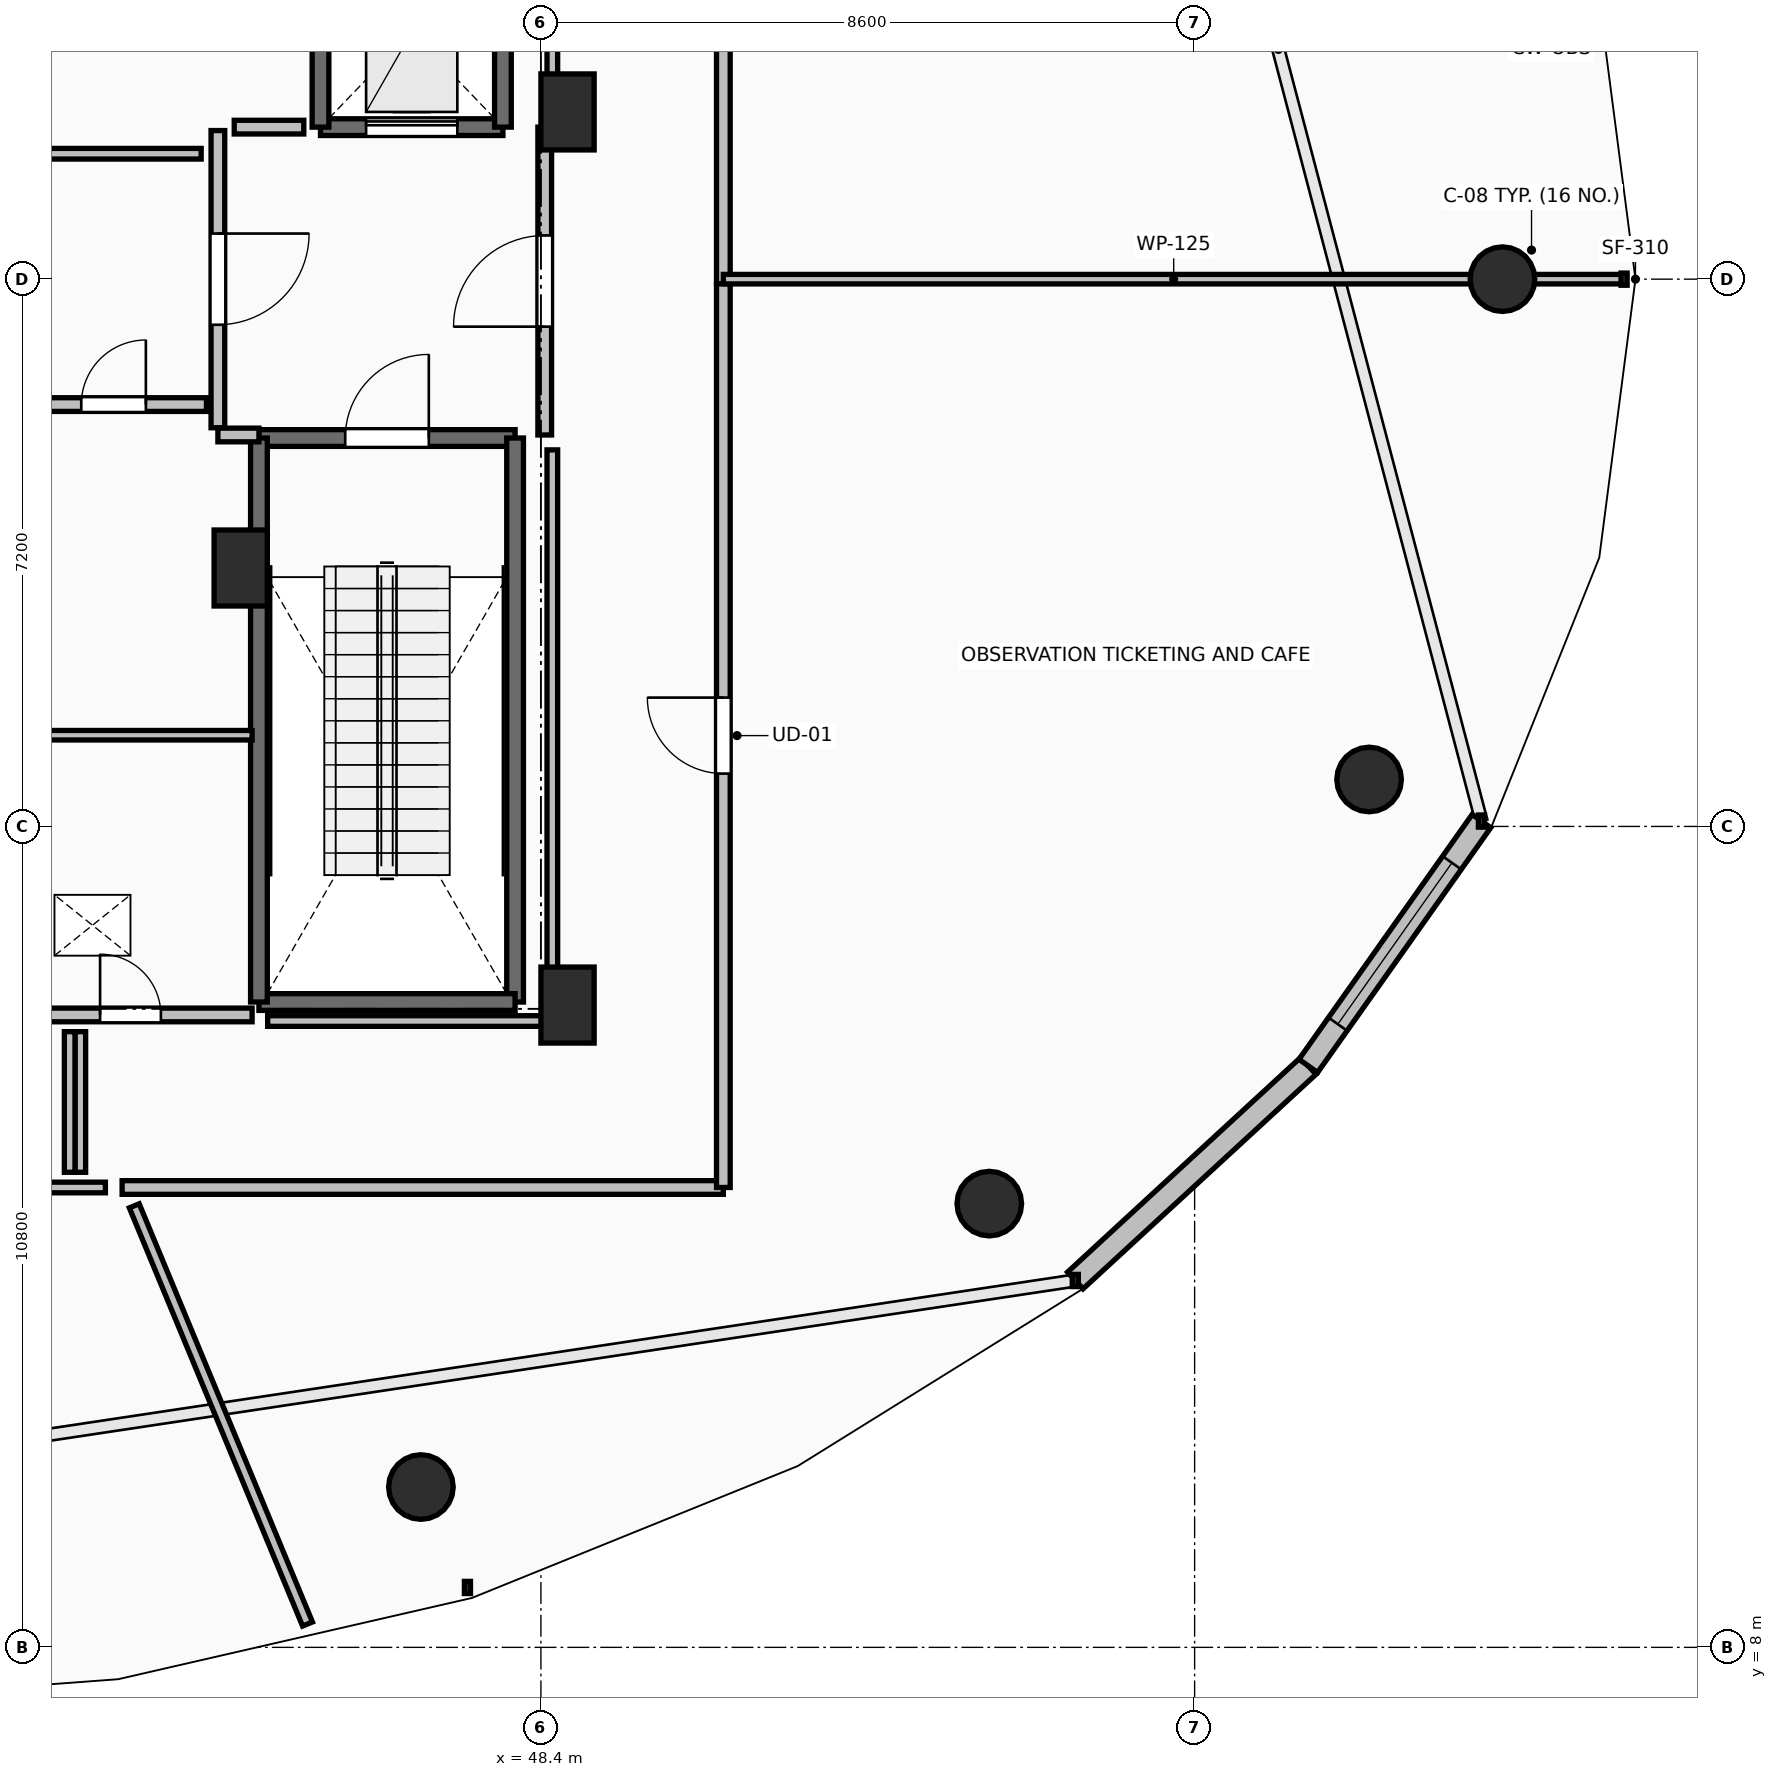
"""IFC4 building model, lengths in metres.
Left out: names, types, materials, properties, quantities, classifications, styles, units other than length and angle.
Written with IfcOpenShell. Run it as: python <this file> out.ifc"""

import sys

from ifc_helpers import new_model, si_unit, direction, frame, frame_2d, origin, origin_2d, place, context, subcontext, project, spatial, rectangle, circle, extrude, element, fill, save


model = new_model("IFC4")
c1 = context("Model", 3, precision=1e-05, world=origin(), true_north=direction((0.0, 1.0)))
c2 = subcontext(c1, "Body", "Model", "MODEL_VIEW")
j1 = project(units=[si_unit("LENGTHUNIT", "METRE"), si_unit("PLANEANGLEUNIT", "RADIAN")], contexts=[c1])
p1 = place(None, origin())
s1 = spatial("IfcSite", under=j1, at=p1, CompositionType="ELEMENT")
p2 = place(p1, origin())
s2 = spatial("IfcBuilding", under=s1, at=p2, CompositionType="ELEMENT")
p3 = place(p2, frame((0.0, 0.0, 285.4)))
s3 = spatial("IfcBuildingStorey", under=s2, at=p3, CompositionType="ELEMENT", Elevation=285.4)
for number, where, z_axis, x_axis in (
    (1, (61.05, 26.0, 0.0), (0.0, 0.0, 1.0), (1.0, 0.0, 0.0)),
    (2, (46.821, 10.109, 0.0), (0.0, 0.0, 1.0), (0.383, -0.924, 0.0)),
    (3, (54.299, 13.838, 0.0), (0.0, 0.0, 1.0), (0.707, -0.707, 0.0)),
    (4, (59.295, 19.418, 0.0), (0.0, 0.0, 1.0), (0.924, -0.383, 0.0)),
):
    element("IfcColumn", number, at=place(p3, frame(where, z_axis=z_axis, x_axis=x_axis)), inside=s3, PredefinedType="COLUMN", context=c2, shape_type="SweptSolid", body=[
        extrude(circle(Radius=0.425, at=origin_2d()), origin(), (0.0, 0.0, 1.0), 5.0),
    ])
for number, where, z_axis, x_axis in (
    (5, (48.75, 28.2, 0.0), (0.0, 0.0, 1.0), (1.0, 0.0, 0.0)),
    (6, (48.75, 16.45, 0.0), (0.0, 0.0, 1.0), (1.0, 0.0, 0.0)),
    (7, (44.45, 22.2, 0.0), (0.0, 0.0, 1.0), (1.0, 0.0, 0.0)),
):
    element("IfcColumn", number, at=place(p3, frame(where, z_axis=z_axis, x_axis=x_axis)), inside=s3, PredefinedType="PILASTER", context=c2, shape_type="SweptSolid", body=[
        extrude(rectangle(XDim=0.7, YDim=1.0, at=origin_2d()), origin(), (0.0, 0.0, 1.0), 5.0),
    ])
p4 = place(p3, frame((55.43, 12.827, 0.0), z_axis=(0.0, 0.0, 1.0), x_axis=(0.735595808164, 0.677420701641, 0.0)))
e8 = element("IfcWall", 8, at=p4, inside=s3, PredefinedType="STANDARD", context=c2, shape_type="SweptSolid", body=[
    extrude(rectangle(XDim=4.167, YDim=0.3, at=frame_2d((2.083, 0.0))), origin(), (0.0, 0.0, 1.0), 4.69),
])
p5 = place(p3, frame((58.496, 15.65, 0.0), z_axis=(0.0, 0.0, 1.0), x_axis=(0.577438563223, 0.816434140457, 0.0)))
e9 = element("IfcWall", 9, at=p5, inside=s3, PredefinedType="STANDARD", context=c2, shape_type="SweptSolid", body=[
    extrude(rectangle(XDim=3.945, YDim=0.3, at=frame_2d((1.973, 0.0))), origin(), (0.0, 0.0, 1.0), 4.69),
])
p6 = place(p5, frame((0.673, 0.0, 0.85)))
e10 = element("IfcOpeningElement", 10, at=p6, cuts=e9, PredefinedType="OPENING", context=c2, shape_type="SweptSolid", body=[
    extrude(rectangle(XDim=2.6, YDim=2.5, at=frame_2d((1.3, 1.25))), frame((0.0, 0.165, 0.0), z_axis=(0.0, -1.0, 0.0), x_axis=(1.0, 0.0, 0.0)), (0.0, 0.0, 1.0), 0.33),
])
p7 = place(p3, frame((44.69, 23.91, 0.0), z_axis=(0.0, 0.0, 1.0), x_axis=(1.0, 0.0, 0.0)))
e11 = element("IfcWall", 11, at=p7, inside=s3, PredefinedType="SOLIDWALL", context=c2, shape_type="SweptSolid", body=[
    extrude(rectangle(XDim=3.37, YDim=0.22, at=frame_2d((1.685, 0.0))), origin(), (0.0, 0.0, 1.0), 4.69),
])
p8 = place(p7, frame((1.135, 0.0, 0.0)))
e12 = element("IfcOpeningElement", 12, at=p8, cuts=e11, PredefinedType="OPENING", context=c2, shape_type="SweptSolid", body=[
    extrude(rectangle(XDim=1.1, YDim=2.15, at=frame_2d((0.55, 1.075))), frame((0.0, 0.125, 0.0), z_axis=(0.0, -1.0, 0.0), x_axis=(1.0, 0.0, 0.0)), (0.0, 0.0, 1.0), 0.25),
])
p9 = place(p3, frame((48.06, 23.91, 0.0), z_axis=(0.0, 0.0, 1.0), x_axis=(0.0, -1.0, 0.0)))
e13 = element("IfcWall", 13, at=p9, inside=s3, PredefinedType="SOLIDWALL", context=c2, shape_type="SweptSolid", body=[
    extrude(rectangle(XDim=7.42, YDim=0.22, at=frame_2d((3.71, 0.0))), origin(), (0.0, 0.0, 1.0), 4.69),
])
p10 = place(p3, frame((48.06, 16.49, 0.0), z_axis=(0.0, 0.0, 1.0), x_axis=(-1.0, 0.0, 0.0)))
e14 = element("IfcWall", 14, at=p10, inside=s3, PredefinedType="SOLIDWALL", context=c2, shape_type="SweptSolid", body=[
    extrude(rectangle(XDim=3.37, YDim=0.22, at=frame_2d((1.685, 0.0))), origin(), (0.0, 0.0, 1.0), 4.69),
])
p11 = place(p3, frame((44.69, 16.49, 0.0), z_axis=(0.0, 0.0, 1.0), x_axis=(0.0, 1.0, 0.0)))
e15 = element("IfcWall", 15, at=p11, inside=s3, PredefinedType="SOLIDWALL", context=c2, shape_type="SweptSolid", body=[
    extrude(rectangle(XDim=7.42, YDim=0.22, at=frame_2d((3.71, 0.0))), origin(), (0.0, 0.0, 1.0), 4.69),
])
p12 = place(p3, frame((45.5, 28.0, 0.0), z_axis=(0.0, 0.0, 1.0), x_axis=(1.0, 0.0, 0.0)))
e16 = element("IfcWall", 16, at=p12, inside=s3, PredefinedType="SHEAR", context=c2, shape_type="SweptSolid", body=[
    extrude(rectangle(XDim=2.4, YDim=0.22, at=frame_2d((1.2, 0.0))), origin(), (0.0, 0.0, 1.0), 4.69),
])
p13 = place(p12, frame((0.6, 0.0, 0.0)))
e17 = element("IfcOpeningElement", 17, at=p13, cuts=e16, PredefinedType="OPENING", context=c2, shape_type="SweptSolid", body=[
    extrude(rectangle(XDim=1.2, YDim=2.2, at=frame_2d((0.6, 1.1))), frame((0.0, 0.125, 0.0), z_axis=(0.0, -1.0, 0.0), x_axis=(1.0, 0.0, 0.0)), (0.0, 0.0, 1.0), 0.25),
])
for number, where, z_axis, x_axis in (
    (18, (47.9, 28.0, 0.0), (0.0, 0.0, 1.0), (0.0, 1.0, 0.0)),
    (19, (45.5, 30.5, 0.0), (0.0, 0.0, 1.0), (0.0, -1.0, 0.0)),
):
    element("IfcWall", number, at=place(p3, frame(where, z_axis=z_axis, x_axis=x_axis)), inside=s3, PredefinedType="SHEAR", context=c2, shape_type="SweptSolid", body=[
        extrude(rectangle(XDim=2.5, YDim=0.22, at=frame_2d((1.25, 0.0))), origin(), (0.0, 0.0, 1.0), 4.69),
    ])
p14 = place(p3, frame((44.15, 27.955, 0.0), z_axis=(0.0, 0.0, 1.0), x_axis=(0.0, -1.0, 0.0)))
e20 = element("IfcWall", 20, at=p14, inside=s3, PredefinedType="PARTITIONING", context=c2, shape_type="SweptSolid", body=[
    extrude(rectangle(XDim=3.91, YDim=0.18, at=frame_2d((1.955, 0.0))), origin(), (0.0, 0.0, 1.0), 4.69),
])
p15 = place(p14, frame((1.355, 0.0, 0.0)))
e21 = element("IfcOpeningElement", 21, at=p15, cuts=e20, PredefinedType="OPENING", context=c2, shape_type="SweptSolid", body=[
    extrude(rectangle(XDim=1.2, YDim=2.15, at=frame_2d((0.6, 1.075))), frame((0.0, 0.105, 0.0), z_axis=(0.0, -1.0, 0.0), x_axis=(1.0, 0.0, 0.0)), (0.0, 0.0, 1.0), 0.21),
])
p16 = place(p3, frame((44.15, 23.95, 0.0), z_axis=(0.0, 0.0, 1.0), x_axis=(1.0, 0.0, 0.0)))
e22 = element("IfcWall", 22, at=p16, inside=s3, PredefinedType="PARTITIONING", context=c2, shape_type="SweptSolid", body=[
    extrude(rectangle(XDim=0.54, YDim=0.18, at=frame_2d((0.27, 0.0))), origin(), (0.0, 0.0, 1.0), 4.69),
])
p17 = place(p3, frame((48.45, 23.95, 0.0), z_axis=(0.0, 0.0, 1.0), x_axis=(0.0, 1.0, 0.0)))
e23 = element("IfcWall", 23, at=p17, inside=s3, PredefinedType="PARTITIONING", context=c2, shape_type="SweptSolid", body=[
    extrude(rectangle(XDim=4.05, YDim=0.18, at=frame_2d((2.025, 0.0))), origin(), (0.0, 0.0, 1.0), 4.69),
])
p18 = place(p17, frame((1.425, 0.0, 0.0)))
e24 = element("IfcOpeningElement", 24, at=p18, cuts=e23, PredefinedType="OPENING", context=c2, shape_type="SweptSolid", body=[
    extrude(rectangle(XDim=1.2, YDim=2.15, at=frame_2d((0.6, 1.075))), frame((0.0, 0.105, 0.0), z_axis=(0.0, -1.0, 0.0), x_axis=(1.0, 0.0, 0.0)), (0.0, 0.0, 1.0), 0.21),
])
p19 = place(p3, frame((41.555, 24.35, 0.0), z_axis=(0.0, 0.0, 1.0), x_axis=(1.0, 0.0, 0.0)))
e25 = element("IfcWall", 25, at=p19, inside=s3, PredefinedType="PARTITIONING", context=c2, shape_type="SweptSolid", body=[
    extrude(rectangle(XDim=2.445, YDim=0.18, at=frame_2d((1.223, 0.0))), origin(), (0.0, 0.0, 1.0), 4.69),
])
p20 = place(p19, frame((0.798, 0.0, 0.0)))
e26 = element("IfcOpeningElement", 26, at=p20, cuts=e25, PredefinedType="OPENING", context=c2, shape_type="SweptSolid", body=[
    extrude(rectangle(XDim=0.85, YDim=2.1, at=frame_2d((0.425, 1.05))), frame((0.0, 0.105, 0.0), z_axis=(0.0, -1.0, 0.0), x_axis=(1.0, 0.0, 0.0)), (0.0, 0.0, 1.0), 0.21),
])
p21 = place(p3, frame((44.6, 20.0, 0.0), z_axis=(0.0, 0.0, 1.0), x_axis=(-1.0, 0.0, 0.0)))
e27 = element("IfcWall", 27, at=p21, inside=s3, PredefinedType="PARTITIONING", context=c2, shape_type="SweptSolid", body=[
    extrude(rectangle(XDim=3.2, YDim=0.125, at=frame_2d((1.6, 0.0))), origin(), (0.0, 0.0, 1.0), 4.69),
])
p22 = place(p3, frame((41.4, 16.32, 0.0), z_axis=(0.0, 0.0, 1.0), x_axis=(1.0, 0.0, 0.0)))
e28 = element("IfcWall", 28, at=p22, inside=s3, PredefinedType="PARTITIONING", context=c2, shape_type="SweptSolid", body=[
    extrude(rectangle(XDim=3.2, YDim=0.18, at=frame_2d((1.6, 0.0))), origin(), (0.0, 0.0, 1.0), 4.69),
])
p23 = place(p22, frame((1.2, 0.0, 0.0)))
e29 = element("IfcOpeningElement", 29, at=p23, cuts=e28, PredefinedType="OPENING", context=c2, shape_type="SweptSolid", body=[
    extrude(rectangle(XDim=0.8, YDim=2.05, at=frame_2d((0.4, 1.025))), frame((0.0, 0.105, 0.0), z_axis=(0.0, -1.0, 0.0), x_axis=(1.0, 0.0, 0.0)), (0.0, 0.0, 1.0), 0.21),
])
p24 = place(p3, frame((50.8, 25.94, 0.0), z_axis=(0.0, 0.0, 1.0), x_axis=(0.0, 1.0, 0.0)))
e30 = element("IfcWall", 30, at=p24, inside=s3, PredefinedType="PARTITIONING", context=c2, shape_type="SweptSolid", body=[
    extrude(rectangle(XDim=10.01, YDim=0.18, at=frame_2d((5.005, 0.0))), origin(), (0.0, 0.0, 1.0), 3.882),
])
p25 = place(p3, frame((42.89, 14.05, 0.0), z_axis=(0.0, 0.0, 1.0), x_axis=(1.0, 0.0, 0.0)))
e31 = element("IfcWall", 31, at=p25, inside=s3, PredefinedType="PARTITIONING", context=c2, shape_type="SweptSolid", body=[
    extrude(rectangle(XDim=7.91, YDim=0.18, at=frame_2d((3.955, 0.0))), origin(), (0.0, 0.0, 1.0), 3.882),
])
p26 = place(p3, frame((50.8, 14.05, 0.0), z_axis=(0.0, 0.0, 1.0), x_axis=(0.0, 1.0, 0.0)))
e32 = element("IfcWall", 32, at=p26, inside=s3, PredefinedType="PARTITIONING", context=c2, shape_type="SweptSolid", body=[
    extrude(rectangle(XDim=11.89, YDim=0.18, at=frame_2d((5.945, 0.0))), origin(), (0.0, 0.0, 1.0), 3.882),
])
p27 = place(p26, frame((5.445, 0.0, 0.0)))
e33 = element("IfcOpeningElement", 33, at=p27, cuts=e32, PredefinedType="OPENING", context=c2, shape_type="SweptSolid", body=[
    extrude(rectangle(XDim=1.0, YDim=2.15, at=frame_2d((0.5, 1.075))), frame((0.0, 0.105, 0.0), z_axis=(0.0, -1.0, 0.0), x_axis=(1.0, 0.0, 0.0)), (0.0, 0.0, 1.0), 0.21),
])
p28 = place(p3, frame((50.8, 26.0, 0.0), z_axis=(0.0, 0.0, 1.0), x_axis=(1.0, 0.0, 0.0)))
e34 = element("IfcWall", 34, at=p28, inside=s3, PredefinedType="PARTITIONING", context=c2, shape_type="SweptSolid", body=[
    extrude(rectangle(XDim=11.849, YDim=0.125, at=frame_2d((5.924, 0.0))), origin(), (0.0, 0.0, 1.0), 3.882),
])
p29 = place(p3, frame((45.28, 28.0, 0.0), z_axis=(0.0, 0.0, 1.0), x_axis=(-1.0, 0.0, 0.0)))
e35 = element("IfcWall", 35, at=p29, inside=s3, PredefinedType="PARTITIONING", context=c2, shape_type="SweptSolid", body=[
    extrude(rectangle(XDim=0.915, YDim=0.18, at=frame_2d((0.458, 0.0))), origin(), (0.0, 0.0, 1.0), 4.69),
])
p30 = place(p3, frame((43.93, 27.65, 0.0), z_axis=(0.0, 0.0, 1.0), x_axis=(-1.0, 0.0, 0.0)))
e36 = element("IfcWall", 36, at=p30, inside=s3, PredefinedType="PARTITIONING", context=c2, shape_type="SweptSolid", body=[
    extrude(rectangle(XDim=4.52, YDim=0.14, at=frame_2d((2.26, 0.0))), origin(), (0.0, 0.0, 1.0), 4.69),
])
p31 = place(p3, frame((39.45, 14.05, 0.0), z_axis=(0.0, 0.0, 1.0), x_axis=(1.0, 0.0, 0.0)))
e37 = element("IfcWall", 37, at=p31, inside=s3, PredefinedType="PARTITIONING", context=c2, shape_type="SweptSolid", body=[
    extrude(rectangle(XDim=3.22, YDim=0.14, at=frame_2d((1.61, 0.0))), origin(), (0.0, 0.0, 1.0), 4.379),
])
p32 = place(p3, frame((42.34, 14.25, 0.0), z_axis=(0.0, 0.0, 1.0), x_axis=(0.0, 1.0, 0.0)))
e38 = element("IfcWall", 38, at=p32, inside=s3, PredefinedType="PARTITIONING", context=c2, shape_type="SweptSolid", body=[
    extrude(rectangle(XDim=1.85, YDim=0.14, at=frame_2d((0.925, 0.0))), origin(), (0.0, 0.0, 1.0), 4.379),
])
p33 = place(p3, frame((44.805, 16.24, 0.0), z_axis=(0.0, 0.0, 1.0), x_axis=(1.0, 0.0, 0.0)))
e39 = element("IfcWall", 39, at=p33, inside=s3, PredefinedType="PARTITIONING", context=c2, shape_type="SweptSolid", body=[
    extrude(rectangle(XDim=3.745, YDim=0.14, at=frame_2d((1.873, 0.0))), origin(), (0.0, 0.0, 1.0), 3.882),
])
p34 = place(p3, frame((48.55, 16.24, 0.0), z_axis=(0.0, 0.0, 1.0), x_axis=(0.0, 1.0, 0.0)))
e40 = element("IfcWall", 40, at=p34, inside=s3, PredefinedType="PARTITIONING", context=c2, shape_type="SweptSolid", body=[
    extrude(rectangle(XDim=7.514, YDim=0.14, at=frame_2d((3.757, 0.0))), origin(), (0.0, 0.0, 1.0), 3.882),
])
p35 = place(p3, frame((48.55, 28.196, 0.0), z_axis=(0.0, 0.0, 1.0), x_axis=(0.0, 1.0, 0.0)))
e41 = element("IfcWall", 41, at=p35, inside=s3, PredefinedType="PARTITIONING", context=c2, shape_type="SweptSolid", body=[
    extrude(rectangle(XDim=5.254, YDim=0.14, at=frame_2d((2.627, 0.0))), origin(), (0.0, 0.0, 1.0), 3.882),
])
p36 = place(p3, frame((42.2, 16.1, 0.0), z_axis=(0.0, 0.0, 1.0), x_axis=(0.0, -1.0, 0.0)))
e42 = element("IfcWall", 42, at=p36, inside=s3, PredefinedType="PARTITIONING", context=c2, shape_type="SweptSolid", body=[
    extrude(rectangle(XDim=1.85, YDim=0.14, at=frame_2d((0.925, 0.0))), origin(), (0.0, 0.0, 1.0), 4.379),
])
p37 = place(p3, frame((43.05, 13.809, 0.0), z_axis=(0.0, 0.0, 1.0), x_axis=(0.382678846666, -0.923881431957, 0.0)))
e43 = element("IfcWall", 43, at=p37, inside=s3, PredefinedType="PARTITIONING", context=c2, shape_type="SweptSolid", body=[
    extrude(rectangle(XDim=5.956, YDim=0.14, at=frame_2d((2.978, 0.0))), origin(), (0.0, 0.0, 1.0), 3.882),
])
p38 = place(p6, origin())
e44 = element("IfcWindow", 44, at=p38, inside=s3, PartitioningType="SINGLE_PANEL", PredefinedType="WINDOW", context=c2, shape_type="SweptSolid", body=[
    extrude(rectangle(XDim=2.6, YDim=2.5, at=frame_2d((1.3, 1.25))), frame((0.0, 0.03, 0.0), z_axis=(0.0, -1.0, 0.0), x_axis=(1.0, 0.0, 0.0)), (0.0, 0.0, 1.0), 0.06),
])
fill(e10, e44)
p39 = place(p8, origin())
e45 = element("IfcDoor", 45, at=p39, inside=s3, OperationType="SINGLE_SWING_RIGHT", PredefinedType="DOOR", context=c2, shape_type="SweptSolid", body=[
    extrude(rectangle(XDim=1.1, YDim=2.15, at=frame_2d((0.55, 1.075))), frame((0.0, 0.025, 0.0), z_axis=(0.0, -1.0, 0.0), x_axis=(1.0, 0.0, 0.0)), (0.0, 0.0, 1.0), 0.05),
])
fill(e12, e45)
p40 = place(p13, origin())
e46 = element("IfcDoor", 46, at=p40, inside=s3, OperationType="SLIDING_TO_LEFT", PredefinedType="DOOR", context=c2, shape_type="SweptSolid", body=[
    extrude(rectangle(XDim=1.2, YDim=2.2, at=frame_2d((0.6, 1.1))), frame((0.0, 0.025, 0.0), z_axis=(0.0, -1.0, 0.0), x_axis=(1.0, 0.0, 0.0)), (0.0, 0.0, 1.0), 0.05),
])
fill(e17, e46)
p41 = place(p15, origin())
e47 = element("IfcDoor", 47, at=p41, inside=s3, OperationType="SINGLE_SWING_LEFT", PredefinedType="DOOR", context=c2, shape_type="SweptSolid", body=[
    extrude(rectangle(XDim=1.2, YDim=2.15, at=frame_2d((0.6, 1.075))), frame((0.0, 0.025, 0.0), z_axis=(0.0, -1.0, 0.0), x_axis=(1.0, 0.0, 0.0)), (0.0, 0.0, 1.0), 0.05),
])
fill(e21, e47)
p42 = place(p18, origin())
e48 = element("IfcDoor", 48, at=p42, inside=s3, OperationType="SINGLE_SWING_LEFT", PredefinedType="DOOR", context=c2, shape_type="SweptSolid", body=[
    extrude(rectangle(XDim=1.2, YDim=2.15, at=frame_2d((0.6, 1.075))), frame((0.0, 0.025, 0.0), z_axis=(0.0, -1.0, 0.0), x_axis=(1.0, 0.0, 0.0)), (0.0, 0.0, 1.0), 0.05),
])
fill(e24, e48)
p43 = place(p20, origin())
e49 = element("IfcDoor", 49, at=p43, inside=s3, OperationType="SINGLE_SWING_RIGHT", PredefinedType="DOOR", context=c2, shape_type="SweptSolid", body=[
    extrude(rectangle(XDim=0.85, YDim=2.1, at=frame_2d((0.425, 1.05))), frame((0.0, 0.025, 0.0), z_axis=(0.0, -1.0, 0.0), x_axis=(1.0, 0.0, 0.0)), (0.0, 0.0, 1.0), 0.05),
])
fill(e26, e49)
p44 = place(p23, origin())
e50 = element("IfcDoor", 50, at=p44, inside=s3, OperationType="SINGLE_SWING_LEFT", PredefinedType="DOOR", context=c2, shape_type="SweptSolid", body=[
    extrude(rectangle(XDim=0.8, YDim=2.05, at=frame_2d((0.4, 1.025))), frame((0.0, 0.025, 0.0), z_axis=(0.0, -1.0, 0.0), x_axis=(1.0, 0.0, 0.0)), (0.0, 0.0, 1.0), 0.05),
])
fill(e29, e50)
p45 = place(p27, origin())
e51 = element("IfcDoor", 51, at=p45, inside=s3, OperationType="SINGLE_SWING_RIGHT", PredefinedType="DOOR", context=c2, shape_type="SweptSolid", body=[
    extrude(rectangle(XDim=1.0, YDim=2.15, at=frame_2d((0.5, 1.075))), frame((0.0, 0.025, 0.0), z_axis=(0.0, -1.0, 0.0), x_axis=(1.0, 0.0, 0.0)), (0.0, 0.0, 1.0), 0.05),
])
fill(e33, e51)
save(model, sys.argv[1])
